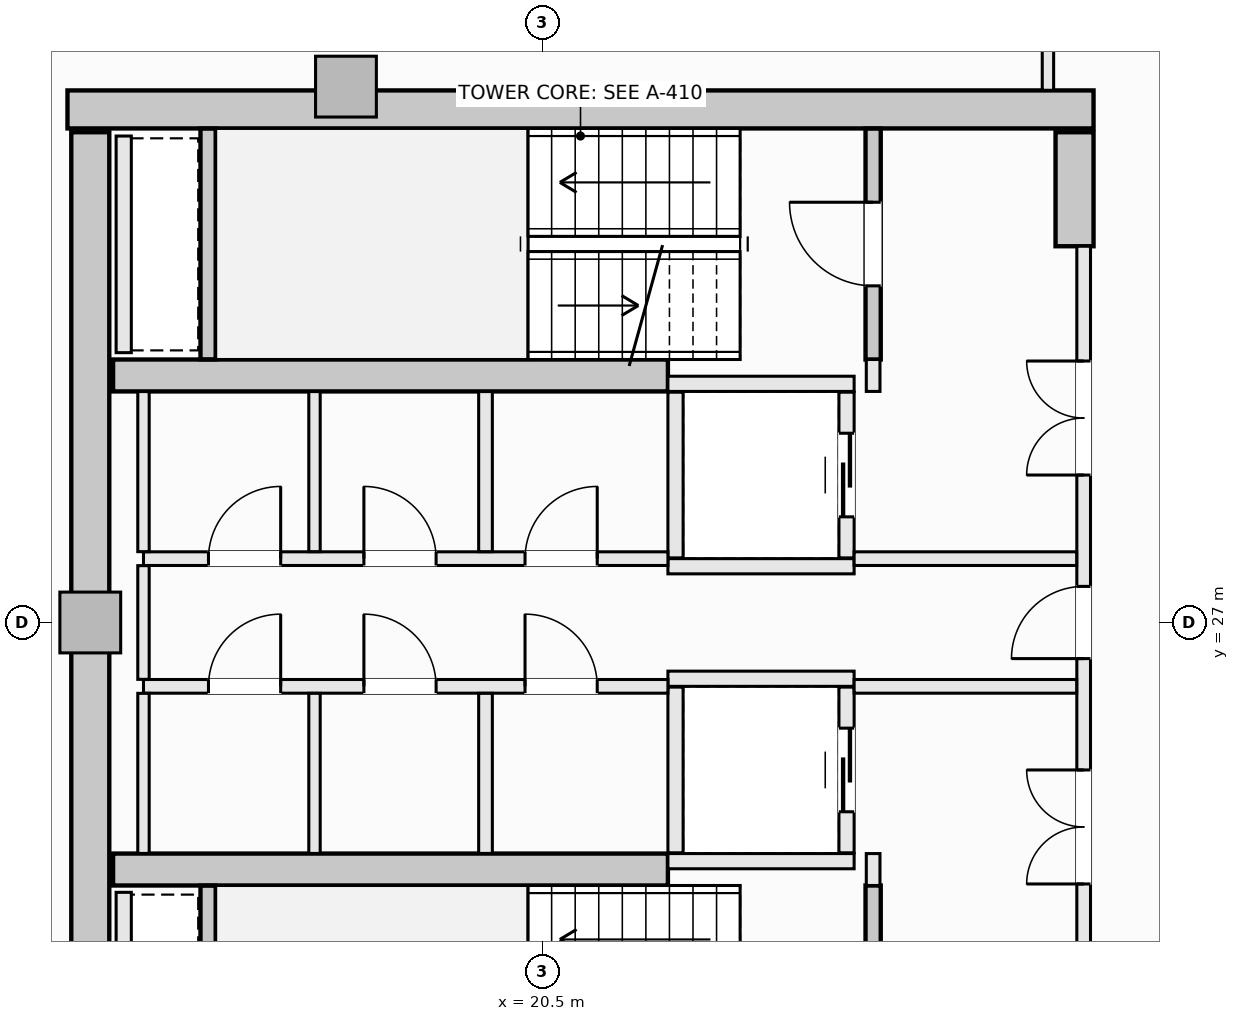
"""IFC4 building model, lengths in metres.
Left out: names, types, materials, properties, quantities, classifications, styles, units other than length and angle.
Written with IfcOpenShell. Run it as: python <this file> out.ifc"""

import sys

from ifc_helpers import new_model, si_unit, direction, frame, frame_2d, origin, origin_2d, place, context, subcontext, project, spatial, rectangle, extrude, element, fill, save


model = new_model("IFC4")
c1 = context("Model", 3, precision=1e-05, world=origin(), true_north=direction((0.0, 1.0)))
c2 = subcontext(c1, "Body", "Model", "MODEL_VIEW")
j1 = project(units=[si_unit("LENGTHUNIT", "METRE"), si_unit("PLANEANGLEUNIT", "RADIAN")], contexts=[c1])
p1 = place(None, origin())
s1 = spatial("IfcSite", under=j1, at=p1, CompositionType="ELEMENT")
p2 = place(p1, origin())
s2 = spatial("IfcBuilding", under=s1, at=p2, CompositionType="ELEMENT")
p3 = place(p2, frame((0.0, 0.0, 259.1)))
s3 = spatial("IfcBuildingStorey", under=s2, at=p3, CompositionType="ELEMENT", Elevation=259.1)
p4 = place(p3, frame((14.25, 33.75, -0.27), z_axis=(0.0, 0.0, 1.0), x_axis=(1.0, 0.0, 0.0)))
e1 = element("IfcWall", 1, at=p4, inside=s3, PredefinedType="SHEAR", context=c2, shape_type="SweptSolid", body=[
    extrude(rectangle(XDim=13.5, YDim=0.5, at=frame_2d((6.75, 0.0))), origin(), (0.0, 0.0, 1.0), 3.3),
])
p5 = place(p3, frame((14.55, 20.55, -0.27), z_axis=(0.0, 0.0, 1.0), x_axis=(0.0, 1.0, 0.0)))
e2 = element("IfcWall", 2, at=p5, inside=s3, PredefinedType="SHEAR", context=c2, shape_type="SweptSolid", body=[
    extrude(rectangle(XDim=12.9, YDim=0.5, at=frame_2d((6.45, 0.0))), origin(), (0.0, 0.0, 1.0), 3.3),
])
p6 = place(p3, frame((27.5, 31.95, -0.27), z_axis=(0.0, 0.0, 1.0), x_axis=(0.0, 1.0, 0.0)))
e3 = element("IfcWall", 3, at=p6, inside=s3, PredefinedType="SHEAR", context=c2, shape_type="SweptSolid", body=[
    extrude(rectangle(XDim=1.5, YDim=0.5, at=frame_2d((0.75, 0.0))), origin(), (0.0, 0.0, 1.0), 3.3),
])
for number, where, z_axis, x_axis in (
    (4, (14.85, 30.25, -0.27), (0.0, 0.0, 1.0), (1.0, 0.0, 0.0)),
    (5, (14.85, 23.75, -0.27), (0.0, 0.0, 1.0), (1.0, 0.0, 0.0)),
):
    element("IfcWall", number, at=place(p3, frame(where, z_axis=z_axis, x_axis=x_axis)), inside=s3, PredefinedType="SHEAR", context=c2, shape_type="SweptSolid", body=[
        extrude(rectangle(XDim=7.3, YDim=0.42, at=frame_2d((3.65, 0.0))), origin(), (0.0, 0.0, 1.0), 3.3),
    ])
for number, where, z_axis, x_axis in (
    (6, (17.914, 34.05, -0.27), (0.0, 0.0, 1.0), (1.0, 0.0, 0.0)),
    (7, (14.55, 27.0, -0.27), (0.0, 0.0, 1.0), (1.0, 0.0, 0.0)),
):
    element("IfcColumn", number, at=place(p3, frame(where, z_axis=z_axis, x_axis=x_axis)), inside=s3, PredefinedType="PILASTER", context=c2, shape_type="SweptSolid", body=[
        extrude(rectangle(XDim=0.8, YDim=0.8, at=origin_2d()), origin(), (0.0, 0.0, 1.0), 3.3),
    ])
p7 = place(p3, frame((24.85, 30.46, -0.27), z_axis=(0.0, 0.0, 1.0), x_axis=(0.0, 1.0, 0.0)))
e8 = element("IfcWall", 8, at=p7, inside=s3, PredefinedType="SHEAR", context=c2, shape_type="SweptSolid", body=[
    extrude(rectangle(XDim=3.038, YDim=0.2, at=frame_2d((1.519, 0.0))), origin(), (0.0, 0.0, 1.0), 3.3),
])
p8 = place(p7, frame((0.969, 0.0, 0.27)))
e9 = element("IfcOpeningElement", 9, at=p8, cuts=e8, PredefinedType="OPENING", context=c2, shape_type="SweptSolid", body=[
    extrude(rectangle(XDim=1.1, YDim=2.15, at=frame_2d((0.55, 1.075))), frame((0.0, 0.11, 0.0), z_axis=(0.0, -1.0, 0.0), x_axis=(1.0, 0.0, 0.0)), (0.0, 0.0, 1.0), 0.22),
])
p9 = place(p3, frame((16.1, 30.462, -0.27), z_axis=(0.0, 0.0, 1.0), x_axis=(0.0, 1.0, 0.0)))
e10 = element("IfcWall", 10, at=p9, inside=s3, PredefinedType="SHEAR", context=c2, shape_type="SweptSolid", body=[
    extrude(rectangle(XDim=3.036, YDim=0.2, at=frame_2d((1.518, 0.0))), origin(), (0.0, 0.0, 1.0), 3.3),
])
p10 = place(p3, frame((24.85, 20.502, -0.27), z_axis=(0.0, 0.0, 1.0), x_axis=(0.0, 1.0, 0.0)))
e11 = element("IfcWall", 11, at=p10, inside=s3, PredefinedType="SHEAR", context=c2, shape_type="SweptSolid", body=[
    extrude(rectangle(XDim=3.038, YDim=0.2, at=frame_2d((1.519, 0.0))), origin(), (0.0, 0.0, 1.0), 3.3),
])
p11 = place(p10, frame((0.969, 0.0, 0.27)))
e12 = element("IfcOpeningElement", 12, at=p11, cuts=e11, PredefinedType="OPENING", context=c2, shape_type="SweptSolid", body=[
    extrude(rectangle(XDim=1.1, YDim=2.15, at=frame_2d((0.55, 1.075))), frame((0.0, 0.11, 0.0), z_axis=(0.0, -1.0, 0.0), x_axis=(1.0, 0.0, 0.0)), (0.0, 0.0, 1.0), 0.22),
])
p12 = place(p3, frame((16.1, 20.502, -0.27), z_axis=(0.0, 0.0, 1.0), x_axis=(0.0, 1.0, 0.0)))
e13 = element("IfcWall", 13, at=p12, inside=s3, PredefinedType="SHEAR", context=c2, shape_type="SweptSolid", body=[
    extrude(rectangle(XDim=3.036, YDim=0.2, at=frame_2d((1.518, 0.0))), origin(), (0.0, 0.0, 1.0), 3.3),
])
for number, where, z_axis, x_axis in (
    (14, (22.15, 30.14, 0.0), (0.0, 0.0, 1.0), (1.0, 0.0, 0.0)),
    (15, (22.15, 27.74, 0.0), (0.0, 0.0, 1.0), (1.0, 0.0, 0.0)),
):
    element("IfcWall", number, at=place(p3, frame(where, z_axis=z_axis, x_axis=x_axis)), inside=s3, PredefinedType="SOLIDWALL", context=c2, shape_type="SweptSolid", body=[
        extrude(rectangle(XDim=2.45, YDim=0.2, at=frame_2d((1.225, 0.0))), origin(), (0.0, 0.0, 1.0), 3.03),
    ])
p13 = place(p3, frame((22.25, 27.85, 0.0), z_axis=(0.0, 0.0, 1.0), x_axis=(0.0, 1.0, 0.0)))
e16 = element("IfcWall", 16, at=p13, inside=s3, PredefinedType="SOLIDWALL", context=c2, shape_type="SweptSolid", body=[
    extrude(rectangle(XDim=2.18, YDim=0.2, at=frame_2d((1.09, 0.0))), origin(), (0.0, 0.0, 1.0), 3.03),
])
p14 = place(p3, frame((24.5, 27.85, 0.0), z_axis=(0.0, 0.0, 1.0), x_axis=(0.0, 1.0, 0.0)))
e17 = element("IfcWall", 17, at=p14, inside=s3, PredefinedType="SOLIDWALL", context=c2, shape_type="SweptSolid", body=[
    extrude(rectangle(XDim=2.18, YDim=0.2, at=frame_2d((1.09, 0.0))), origin(), (0.0, 0.0, 1.0), 3.03),
])
p15 = place(p14, frame((0.54, 0.0, 0.0)))
e18 = element("IfcOpeningElement", 18, at=p15, cuts=e17, PredefinedType="OPENING", context=c2, shape_type="SweptSolid", body=[
    extrude(rectangle(XDim=1.1, YDim=2.2, at=frame_2d((0.55, 1.1))), frame((0.0, 0.11, 0.0), z_axis=(0.0, -1.0, 0.0), x_axis=(1.0, 0.0, 0.0)), (0.0, 0.0, 1.0), 0.22),
])
for number, where, z_axis, x_axis in (
    (19, (22.15, 26.26, 0.0), (0.0, 0.0, 1.0), (1.0, 0.0, 0.0)),
    (20, (22.15, 23.86, 0.0), (0.0, 0.0, 1.0), (1.0, 0.0, 0.0)),
):
    element("IfcWall", number, at=place(p3, frame(where, z_axis=z_axis, x_axis=x_axis)), inside=s3, PredefinedType="SOLIDWALL", context=c2, shape_type="SweptSolid", body=[
        extrude(rectangle(XDim=2.45, YDim=0.2, at=frame_2d((1.225, 0.0))), origin(), (0.0, 0.0, 1.0), 3.03),
    ])
p16 = place(p3, frame((22.25, 23.97, 0.0), z_axis=(0.0, 0.0, 1.0), x_axis=(0.0, 1.0, 0.0)))
e21 = element("IfcWall", 21, at=p16, inside=s3, PredefinedType="SOLIDWALL", context=c2, shape_type="SweptSolid", body=[
    extrude(rectangle(XDim=2.18, YDim=0.2, at=frame_2d((1.09, 0.0))), origin(), (0.0, 0.0, 1.0), 3.03),
])
p17 = place(p3, frame((24.5, 23.97, 0.0), z_axis=(0.0, 0.0, 1.0), x_axis=(0.0, 1.0, 0.0)))
e22 = element("IfcWall", 22, at=p17, inside=s3, PredefinedType="SOLIDWALL", context=c2, shape_type="SweptSolid", body=[
    extrude(rectangle(XDim=2.18, YDim=0.2, at=frame_2d((1.09, 0.0))), origin(), (0.0, 0.0, 1.0), 3.03),
])
p18 = place(p17, frame((0.54, 0.0, 0.0)))
e23 = element("IfcOpeningElement", 23, at=p18, cuts=e22, PredefinedType="OPENING", context=c2, shape_type="SweptSolid", body=[
    extrude(rectangle(XDim=1.1, YDim=2.2, at=frame_2d((0.55, 1.1))), frame((0.0, 0.11, 0.0), z_axis=(0.0, -1.0, 0.0), x_axis=(1.0, 0.0, 0.0)), (0.0, 0.0, 1.0), 0.22),
])
for number, where, z_axis, x_axis in (
    (24, (14.99, 30.55, 0.0), (0.0, 0.0, 1.0), (0.0, 1.0, 0.0)),
    (25, (14.99, 20.6, 0.0), (0.0, 0.0, 1.0), (0.0, 1.0, 0.0)),
):
    element("IfcWall", number, at=place(p3, frame(where, z_axis=z_axis, x_axis=x_axis)), inside=s3, PredefinedType="SOLIDWALL", context=c2, shape_type="SweptSolid", body=[
        extrude(rectangle(XDim=2.85, YDim=0.2, at=frame_2d((1.425, 0.0))), origin(), (0.0, 0.0, 1.0), 3.03),
    ])
for number, where, z_axis, x_axis in (
    (26, (24.85, 23.54, 0.0), (0.0, 0.0, 1.0), (0.0, 1.0, 0.0)),
    (27, (24.85, 30.04, 0.0), (0.0, 0.0, 1.0), (0.0, 1.0, 0.0)),
):
    element("IfcWall", number, at=place(p3, frame(where, z_axis=z_axis, x_axis=x_axis)), inside=s3, PredefinedType="SOLIDWALL", context=c2, shape_type="SweptSolid", body=[
        extrude(rectangle(XDim=0.42, YDim=0.18, at=frame_2d((0.21, 0.0))), origin(), (0.0, 0.0, 1.0), 3.03),
    ])
p19 = place(p3, frame((27.62, 22.05, 0.0), z_axis=(0.0, 0.0, 1.0), x_axis=(0.0, 1.0, 0.0)))
e28 = element("IfcWall", 28, at=p19, inside=s3, PredefinedType="SOLIDWALL", context=c2, shape_type="SweptSolid", body=[
    extrude(rectangle(XDim=9.9, YDim=0.18, at=frame_2d((4.95, 0.0))), origin(), (0.0, 0.0, 1.0), 3.03),
])
p20 = place(p19, frame((4.475, 0.0, 0.0)))
e29 = element("IfcOpeningElement", 29, at=p20, cuts=e28, PredefinedType="OPENING", context=c2, shape_type="SweptSolid", body=[
    extrude(rectangle(XDim=0.95, YDim=2.1, at=frame_2d((0.475, 1.05))), frame((0.0, 0.1, 0.0), z_axis=(0.0, -1.0, 0.0), x_axis=(1.0, 0.0, 0.0)), (0.0, 0.0, 1.0), 0.2),
])
p21 = place(p19, frame((6.89, 0.0, 0.0)))
e30 = element("IfcOpeningElement", 30, at=p21, cuts=e28, PredefinedType="OPENING", context=c2, shape_type="SweptSolid", body=[
    extrude(rectangle(XDim=1.5, YDim=2.2, at=frame_2d((0.75, 1.1))), frame((0.0, 0.1, 0.0), z_axis=(0.0, -1.0, 0.0), x_axis=(1.0, 0.0, 0.0)), (0.0, 0.0, 1.0), 0.2),
])
p22 = place(p19, frame((1.51, 0.0, 0.0)))
e31 = element("IfcOpeningElement", 31, at=p22, cuts=e28, PredefinedType="OPENING", context=c2, shape_type="SweptSolid", body=[
    extrude(rectangle(XDim=1.5, YDim=2.2, at=frame_2d((0.75, 1.1))), frame((0.0, 0.1, 0.0), z_axis=(0.0, -1.0, 0.0), x_axis=(1.0, 0.0, 0.0)), (0.0, 0.0, 1.0), 0.2),
])
p23 = place(p3, frame((15.25, 27.84, 0.0), z_axis=(0.0, 0.0, 1.0), x_axis=(1.0, 0.0, 0.0)))
e32 = element("IfcWall", 32, at=p23, inside=s3, PredefinedType="SOLIDWALL", context=c2, shape_type="SweptSolid", body=[
    extrude(rectangle(XDim=6.9, YDim=0.18, at=frame_2d((3.45, 0.0))), origin(), (0.0, 0.0, 1.0), 3.03),
])
p24 = place(p23, frame((5.02, 0.0, 0.0)))
e33 = element("IfcOpeningElement", 33, at=p24, cuts=e32, PredefinedType="OPENING", context=c2, shape_type="SweptSolid", body=[
    extrude(rectangle(XDim=0.95, YDim=2.1, at=frame_2d((0.475, 1.05))), frame((0.0, 0.1, 0.0), z_axis=(0.0, -1.0, 0.0), x_axis=(1.0, 0.0, 0.0)), (0.0, 0.0, 1.0), 0.2),
])
p25 = place(p23, frame((0.855, 0.0, 0.0)))
e34 = element("IfcOpeningElement", 34, at=p25, cuts=e32, PredefinedType="OPENING", context=c2, shape_type="SweptSolid", body=[
    extrude(rectangle(XDim=0.95, YDim=2.1, at=frame_2d((0.475, 1.05))), frame((0.0, 0.1, 0.0), z_axis=(0.0, -1.0, 0.0), x_axis=(1.0, 0.0, 0.0)), (0.0, 0.0, 1.0), 0.2),
])
p26 = place(p23, frame((2.9, 0.0, 0.0)))
e35 = element("IfcOpeningElement", 35, at=p26, cuts=e32, PredefinedType="OPENING", context=c2, shape_type="SweptSolid", body=[
    extrude(rectangle(XDim=0.95, YDim=2.1, at=frame_2d((0.475, 1.05))), frame((0.0, 0.1, 0.0), z_axis=(0.0, -1.0, 0.0), x_axis=(1.0, 0.0, 0.0)), (0.0, 0.0, 1.0), 0.2),
])
p27 = place(p3, frame((24.6, 27.84, 0.0), z_axis=(0.0, 0.0, 1.0), x_axis=(1.0, 0.0, 0.0)))
e36 = element("IfcWall", 36, at=p27, inside=s3, PredefinedType="SOLIDWALL", context=c2, shape_type="SweptSolid", body=[
    extrude(rectangle(XDim=2.928, YDim=0.18, at=frame_2d((1.464, 0.0))), origin(), (0.0, 0.0, 1.0), 3.03),
])
p28 = place(p3, frame((15.25, 26.16, 0.0), z_axis=(0.0, 0.0, 1.0), x_axis=(1.0, 0.0, 0.0)))
e37 = element("IfcWall", 37, at=p28, inside=s3, PredefinedType="SOLIDWALL", context=c2, shape_type="SweptSolid", body=[
    extrude(rectangle(XDim=6.9, YDim=0.18, at=frame_2d((3.45, 0.0))), origin(), (0.0, 0.0, 1.0), 3.03),
])
p29 = place(p28, frame((5.02, 0.0, 0.0)))
e38 = element("IfcOpeningElement", 38, at=p29, cuts=e37, PredefinedType="OPENING", context=c2, shape_type="SweptSolid", body=[
    extrude(rectangle(XDim=0.95, YDim=2.1, at=frame_2d((0.475, 1.05))), frame((0.0, 0.1, 0.0), z_axis=(0.0, -1.0, 0.0), x_axis=(1.0, 0.0, 0.0)), (0.0, 0.0, 1.0), 0.2),
])
p30 = place(p28, frame((0.855, 0.0, 0.0)))
e39 = element("IfcOpeningElement", 39, at=p30, cuts=e37, PredefinedType="OPENING", context=c2, shape_type="SweptSolid", body=[
    extrude(rectangle(XDim=0.95, YDim=2.1, at=frame_2d((0.475, 1.05))), frame((0.0, 0.1, 0.0), z_axis=(0.0, -1.0, 0.0), x_axis=(1.0, 0.0, 0.0)), (0.0, 0.0, 1.0), 0.2),
])
p31 = place(p28, frame((2.9, 0.0, 0.0)))
e40 = element("IfcOpeningElement", 40, at=p31, cuts=e37, PredefinedType="OPENING", context=c2, shape_type="SweptSolid", body=[
    extrude(rectangle(XDim=0.95, YDim=2.1, at=frame_2d((0.475, 1.05))), frame((0.0, 0.1, 0.0), z_axis=(0.0, -1.0, 0.0), x_axis=(1.0, 0.0, 0.0)), (0.0, 0.0, 1.0), 0.2),
])
p32 = place(p3, frame((24.6, 26.16, 0.0), z_axis=(0.0, 0.0, 1.0), x_axis=(1.0, 0.0, 0.0)))
e41 = element("IfcWall", 41, at=p32, inside=s3, PredefinedType="SOLIDWALL", context=c2, shape_type="SweptSolid", body=[
    extrude(rectangle(XDim=2.928, YDim=0.18, at=frame_2d((1.464, 0.0))), origin(), (0.0, 0.0, 1.0), 3.03),
])
p33 = place(p3, frame((15.25, 23.962, 0.0), z_axis=(0.0, 0.0, 1.0), x_axis=(0.0, 1.0, 0.0)))
e42 = element("IfcWall", 42, at=p33, inside=s3, PredefinedType="PARTITIONING", context=c2, shape_type="SweptSolid", body=[
    extrude(rectangle(XDim=2.106, YDim=0.15, at=frame_2d((1.053, 0.0))), origin(), (0.0, 0.0, 1.0), 3.03),
])
p34 = place(p3, frame((15.25, 26.252, 0.0), z_axis=(0.0, 0.0, 1.0), x_axis=(0.0, 1.0, 0.0)))
e43 = element("IfcWall", 43, at=p34, inside=s3, PredefinedType="PARTITIONING", context=c2, shape_type="SweptSolid", body=[
    extrude(rectangle(XDim=1.496, YDim=0.15, at=frame_2d((0.748, 0.0))), origin(), (0.0, 0.0, 1.0), 3.03),
])
p35 = place(p3, frame((15.25, 27.932, 0.0), z_axis=(0.0, 0.0, 1.0), x_axis=(0.0, 1.0, 0.0)))
e44 = element("IfcWall", 44, at=p35, inside=s3, PredefinedType="PARTITIONING", context=c2, shape_type="SweptSolid", body=[
    extrude(rectangle(XDim=2.106, YDim=0.15, at=frame_2d((1.053, 0.0))), origin(), (0.0, 0.0, 1.0), 3.03),
])
for number, where, z_axis, x_axis in (
    (45, (19.75, 23.962, 0.0), (0.0, 0.0, 1.0), (0.0, 1.0, 0.0)),
    (46, (19.75, 27.932, 0.0), (0.0, 0.0, 1.0), (0.0, 1.0, 0.0)),
):
    element("IfcWall", number, at=place(p3, frame(where, z_axis=z_axis, x_axis=x_axis)), inside=s3, PredefinedType="SOLIDWALL", context=c2, shape_type="SweptSolid", body=[
        extrude(rectangle(XDim=2.106, YDim=0.18, at=frame_2d((1.053, 0.0))), origin(), (0.0, 0.0, 1.0), 3.03),
    ])
for number, where, z_axis, x_axis in (
    (47, (17.5, 23.962, 0.0), (0.0, 0.0, 1.0), (0.0, 1.0, 0.0)),
    (48, (17.5, 27.932, 0.0), (0.0, 0.0, 1.0), (0.0, 1.0, 0.0)),
):
    element("IfcWall", number, at=place(p3, frame(where, z_axis=z_axis, x_axis=x_axis)), inside=s3, PredefinedType="PARTITIONING", context=c2, shape_type="SweptSolid", body=[
        extrude(rectangle(XDim=2.106, YDim=0.15, at=frame_2d((1.053, 0.0))), origin(), (0.0, 0.0, 1.0), 3.03),
    ])
p36 = place(p3, frame((27.15, 34.002, 0.0), z_axis=(0.0, 0.0, 1.0), x_axis=(0.0, 1.0, 0.0)))
e49 = element("IfcWall", 49, at=p36, inside=s3, PredefinedType="PARTITIONING", context=c2, shape_type="SweptSolid", body=[
    extrude(rectangle(XDim=4.198, YDim=0.15, at=frame_2d((2.099, 0.0))), origin(), (0.0, 0.0, 1.0), 3.03),
])
p37 = place(p36, frame((1.998, 0.0, 0.0)))
e50 = element("IfcOpeningElement", 50, at=p37, cuts=e49, PredefinedType="OPENING", context=c2, shape_type="SweptSolid", body=[
    extrude(rectangle(XDim=0.95, YDim=2.1, at=frame_2d((0.475, 1.05))), frame((0.0, 0.085, 0.0), z_axis=(0.0, -1.0, 0.0), x_axis=(1.0, 0.0, 0.0)), (0.0, 0.0, 1.0), 0.17),
])
p38 = place(p8, origin())
e51 = element("IfcDoor", 51, at=p38, inside=s3, OperationType="SINGLE_SWING_RIGHT", PredefinedType="DOOR", context=c2, shape_type="SweptSolid", body=[
    extrude(rectangle(XDim=1.1, YDim=2.15, at=frame_2d((0.55, 1.075))), frame((0.0, 0.025, 0.0), z_axis=(0.0, -1.0, 0.0), x_axis=(1.0, 0.0, 0.0)), (0.0, 0.0, 1.0), 0.05),
])
fill(e9, e51)
p39 = place(p15, origin())
e52 = element("IfcDoor", 52, at=p39, inside=s3, OperationType="SLIDING_TO_LEFT", PredefinedType="DOOR", context=c2, shape_type="SweptSolid", body=[
    extrude(rectangle(XDim=1.1, YDim=2.2, at=frame_2d((0.55, 1.1))), frame((0.0, 0.025, 0.0), z_axis=(0.0, -1.0, 0.0), x_axis=(1.0, 0.0, 0.0)), (0.0, 0.0, 1.0), 0.05),
])
fill(e18, e52)
p40 = place(p18, origin())
e53 = element("IfcDoor", 53, at=p40, inside=s3, OperationType="SLIDING_TO_LEFT", PredefinedType="DOOR", context=c2, shape_type="SweptSolid", body=[
    extrude(rectangle(XDim=1.1, YDim=2.2, at=frame_2d((0.55, 1.1))), frame((0.0, 0.025, 0.0), z_axis=(0.0, -1.0, 0.0), x_axis=(1.0, 0.0, 0.0)), (0.0, 0.0, 1.0), 0.05),
])
fill(e23, e53)
p41 = place(p20, origin())
e54 = element("IfcDoor", 54, at=p41, inside=s3, OperationType="SINGLE_SWING_LEFT", PredefinedType="DOOR", context=c2, shape_type="SweptSolid", body=[
    extrude(rectangle(XDim=0.95, YDim=2.1, at=frame_2d((0.475, 1.05))), frame((0.0, 0.025, 0.0), z_axis=(0.0, -1.0, 0.0), x_axis=(1.0, 0.0, 0.0)), (0.0, 0.0, 1.0), 0.05),
])
fill(e29, e54)
p42 = place(p21, origin())
e55 = element("IfcDoor", 55, at=p42, inside=s3, OperationType="DOUBLE_DOOR_SINGLE_SWING", PredefinedType="DOOR", context=c2, shape_type="SweptSolid", body=[
    extrude(rectangle(XDim=1.5, YDim=2.2, at=frame_2d((0.75, 1.1))), frame((0.0, 0.025, 0.0), z_axis=(0.0, -1.0, 0.0), x_axis=(1.0, 0.0, 0.0)), (0.0, 0.0, 1.0), 0.05),
])
fill(e30, e55)
p43 = place(p22, origin())
e56 = element("IfcDoor", 56, at=p43, inside=s3, OperationType="DOUBLE_DOOR_SINGLE_SWING", PredefinedType="DOOR", context=c2, shape_type="SweptSolid", body=[
    extrude(rectangle(XDim=1.5, YDim=2.2, at=frame_2d((0.75, 1.1))), frame((0.0, 0.025, 0.0), z_axis=(0.0, -1.0, 0.0), x_axis=(1.0, 0.0, 0.0)), (0.0, 0.0, 1.0), 0.05),
])
fill(e31, e56)
p44 = place(p24, origin())
e57 = element("IfcDoor", 57, at=p44, inside=s3, OperationType="SINGLE_SWING_RIGHT", PredefinedType="DOOR", context=c2, shape_type="SweptSolid", body=[
    extrude(rectangle(XDim=0.95, YDim=2.1, at=frame_2d((0.475, 1.05))), frame((0.0, 0.025, 0.0), z_axis=(0.0, -1.0, 0.0), x_axis=(1.0, 0.0, 0.0)), (0.0, 0.0, 1.0), 0.05),
])
fill(e33, e57)
p45 = place(p29, origin())
e58 = element("IfcDoor", 58, at=p45, inside=s3, OperationType="SINGLE_SWING_LEFT", PredefinedType="DOOR", context=c2, shape_type="SweptSolid", body=[
    extrude(rectangle(XDim=0.95, YDim=2.1, at=frame_2d((0.475, 1.05))), frame((0.0, 0.025, 0.0), z_axis=(0.0, -1.0, 0.0), x_axis=(1.0, 0.0, 0.0)), (0.0, 0.0, 1.0), 0.05),
])
fill(e38, e58)
p46 = place(p25, origin())
e59 = element("IfcDoor", 59, at=p46, inside=s3, OperationType="SINGLE_SWING_RIGHT", PredefinedType="DOOR", context=c2, shape_type="SweptSolid", body=[
    extrude(rectangle(XDim=0.95, YDim=2.1, at=frame_2d((0.475, 1.05))), frame((0.0, 0.025, 0.0), z_axis=(0.0, -1.0, 0.0), x_axis=(1.0, 0.0, 0.0)), (0.0, 0.0, 1.0), 0.05),
])
fill(e34, e59)
p47 = place(p26, origin())
e60 = element("IfcDoor", 60, at=p47, inside=s3, OperationType="SINGLE_SWING_LEFT", PredefinedType="DOOR", context=c2, shape_type="SweptSolid", body=[
    extrude(rectangle(XDim=0.95, YDim=2.1, at=frame_2d((0.475, 1.05))), frame((0.0, 0.025, 0.0), z_axis=(0.0, -1.0, 0.0), x_axis=(1.0, 0.0, 0.0)), (0.0, 0.0, 1.0), 0.05),
])
fill(e35, e60)
p48 = place(p30, origin())
e61 = element("IfcDoor", 61, at=p48, inside=s3, OperationType="SINGLE_SWING_RIGHT", PredefinedType="DOOR", context=c2, shape_type="SweptSolid", body=[
    extrude(rectangle(XDim=0.95, YDim=2.1, at=frame_2d((0.475, 1.05))), frame((0.0, 0.025, 0.0), z_axis=(0.0, -1.0, 0.0), x_axis=(1.0, 0.0, 0.0)), (0.0, 0.0, 1.0), 0.05),
])
fill(e39, e61)
p49 = place(p31, origin())
e62 = element("IfcDoor", 62, at=p49, inside=s3, OperationType="SINGLE_SWING_LEFT", PredefinedType="DOOR", context=c2, shape_type="SweptSolid", body=[
    extrude(rectangle(XDim=0.95, YDim=2.1, at=frame_2d((0.475, 1.05))), frame((0.0, 0.025, 0.0), z_axis=(0.0, -1.0, 0.0), x_axis=(1.0, 0.0, 0.0)), (0.0, 0.0, 1.0), 0.05),
])
fill(e40, e62)
save(model, sys.argv[1])
